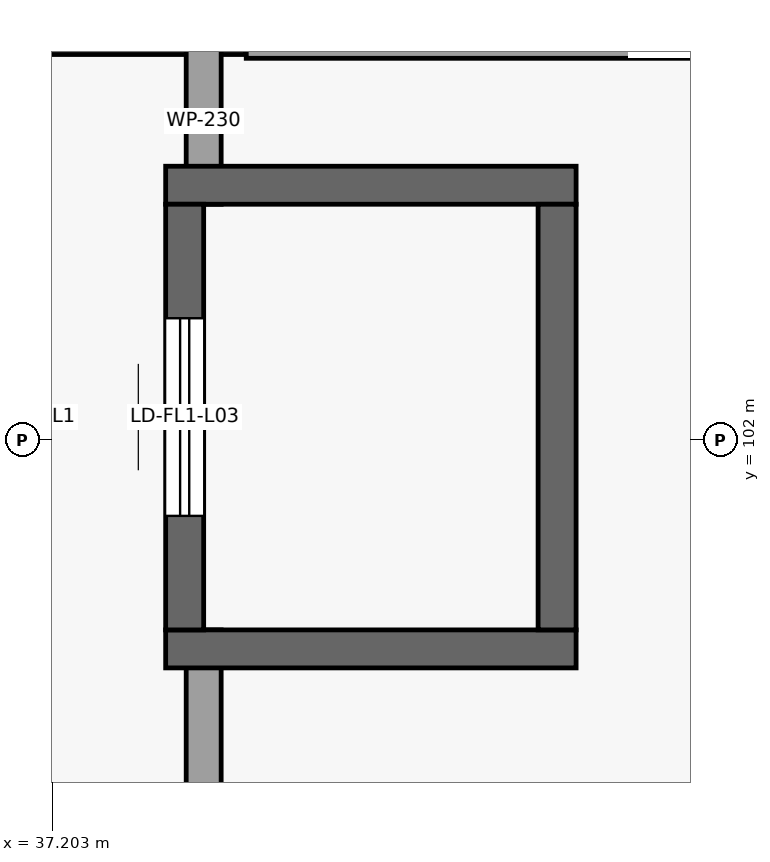
"""IFC4 building model, lengths in metres.
Left out: names, types, materials, properties, quantities, classifications, styles, units other than length and angle.
Written with IfcOpenShell. Run it as: python <this file> out.ifc"""

import sys

from ifc_helpers import new_model, si_unit, direction, frame, frame_2d, origin, place, context, subcontext, project, spatial, rectangle, extrude, element, fill, save


model = new_model("IFC4")
c1 = context("Model", 3, precision=1e-05, world=origin(), true_north=direction((0.0, 1.0)))
c2 = subcontext(c1, "Body", "Model", "MODEL_VIEW")
j1 = project(units=[si_unit("LENGTHUNIT", "METRE"), si_unit("PLANEANGLEUNIT", "RADIAN")], contexts=[c1])
p1 = place(None, origin())
s1 = spatial("IfcSite", under=j1, at=p1, CompositionType="ELEMENT")
p2 = place(p1, origin())
s2 = spatial("IfcBuilding", under=s1, at=p2, CompositionType="ELEMENT")
p3 = place(p2, frame((0.0, 0.0, 10.2)))
s3 = spatial("IfcBuildingStorey", under=s2, at=p3, CompositionType="ELEMENT", Elevation=10.2)
p4 = place(p3, frame((34.59, 104.65, 0.0), z_axis=(0.0, 0.0, 1.0), x_axis=(1.0, 0.0, 0.0)))
e1 = element("IfcWall", 1, at=p4, inside=s3, PredefinedType="PARTITIONING", context=c2, shape_type="SweptSolid", body=[
    extrude(rectangle(XDim=3.89, YDim=0.23, at=frame_2d((1.945, 0.0))), origin(), (0.0, 0.0, 1.0), 4.82),
])
p5 = place(p4, frame((1.15, 0.0, 0.0)))
e2 = element("IfcOpeningElement", 2, at=p5, cuts=e1, PredefinedType="OPENING", context=c2, shape_type="SweptSolid", body=[
    extrude(rectangle(XDim=1.2, YDim=2.2, at=frame_2d((0.6, 1.1))), frame((0.0, 0.125, 0.0), z_axis=(0.0, -1.0, 0.0), x_axis=(1.0, 0.0, 0.0)), (0.0, 0.0, 1.0), 0.25),
])
p6 = place(p3, frame((38.2, 104.65, 0.0), z_axis=(0.0, 0.0, 1.0), x_axis=(0.0, -1.0, 0.0)))
e3 = element("IfcWall", 3, at=p6, inside=s3, PredefinedType="PARTITIONING", context=c2, shape_type="SweptSolid", body=[
    extrude(rectangle(XDim=1.1, YDim=0.23, at=frame_2d((0.55, 0.0))), origin(), (0.0, 0.0, 1.0), 4.82),
])
p7 = place(p3, frame((38.2, 100.75, 0.0), z_axis=(0.0, 0.0, 1.0), x_axis=(0.0, -1.0, 0.0)))
e4 = element("IfcWall", 4, at=p7, inside=s3, PredefinedType="PARTITIONING", context=c2, shape_type="SweptSolid", body=[
    extrude(rectangle(XDim=1.25, YDim=0.23, at=frame_2d((0.625, 0.0))), origin(), (0.0, 0.0, 1.0), 4.82),
])
for number, where, z_axis, x_axis in (
    (5, (37.95, 100.625, 0.0), (0.0, 0.0, 1.0), (1.0, 0.0, 0.0)),
    (6, (40.65, 103.675, 0.0), (0.0, 0.0, 1.0), (-1.0, 0.0, 0.0)),
):
    element("IfcWall", number, at=place(p3, frame(where, z_axis=z_axis, x_axis=x_axis)), inside=s3, PredefinedType="SHEAR", context=c2, shape_type="SweptSolid", body=[
        extrude(rectangle(XDim=2.7, YDim=0.25, at=frame_2d((1.35, 0.0))), origin(), (0.0, 0.0, 1.0), 4.82),
    ])
p8 = place(p3, frame((38.075, 100.75, 0.0), z_axis=(0.0, 0.0, 1.0), x_axis=(0.0, 1.0, 0.0)))
e7 = element("IfcWall", 7, at=p8, inside=s3, PredefinedType="SHEAR", context=c2, shape_type="SweptSolid", body=[
    extrude(rectangle(XDim=2.8, YDim=0.25, at=frame_2d((1.4, 0.0))), origin(), (0.0, 0.0, 1.0), 4.82),
])
p9 = place(p8, frame((0.75, 0.0, 0.0)))
e8 = element("IfcOpeningElement", 8, at=p9, cuts=e7, PredefinedType="OPENING", context=c2, shape_type="SweptSolid", body=[
    extrude(rectangle(XDim=1.3, YDim=2.25, at=frame_2d((0.65, 1.125))), frame((0.0, 0.135, 0.0), z_axis=(0.0, -1.0, 0.0), x_axis=(1.0, 0.0, 0.0)), (0.0, 0.0, 1.0), 0.27),
])
p10 = place(p3, frame((40.525, 103.55, 0.0), z_axis=(0.0, 0.0, 1.0), x_axis=(0.0, -1.0, 0.0)))
e9 = element("IfcWall", 9, at=p10, inside=s3, PredefinedType="SHEAR", context=c2, shape_type="SweptSolid", body=[
    extrude(rectangle(XDim=2.8, YDim=0.25, at=frame_2d((1.4, 0.0))), origin(), (0.0, 0.0, 1.0), 4.82),
])
p11 = place(p3, frame((38.48, 104.6, 0.0), z_axis=(0.0, 0.0, 1.0), x_axis=(1.0, 0.0, 0.0)))
e10 = element("IfcWall", 10, at=p11, inside=s3, PredefinedType="PARTITIONING", context=c2, shape_type="SweptSolid", body=[
    extrude(rectangle(XDim=5.55, YDim=0.18, at=frame_2d((2.775, 0.0))), origin(), (0.0, 0.0, 1.0), 4.82),
])
p12 = place(p9, origin())
e11 = element("IfcDoor", 11, at=p12, inside=s3, OperationType="SLIDING_TO_RIGHT", PredefinedType="DOOR", context=c2, shape_type="SweptSolid", body=[
    extrude(rectangle(XDim=1.3, YDim=2.25, at=frame_2d((0.65, 1.125))), frame((0.0, 0.025, 0.0), z_axis=(0.0, -1.0, 0.0), x_axis=(1.0, 0.0, 0.0)), (0.0, 0.0, 1.0), 0.05),
])
fill(e8, e11)
save(model, sys.argv[1])
